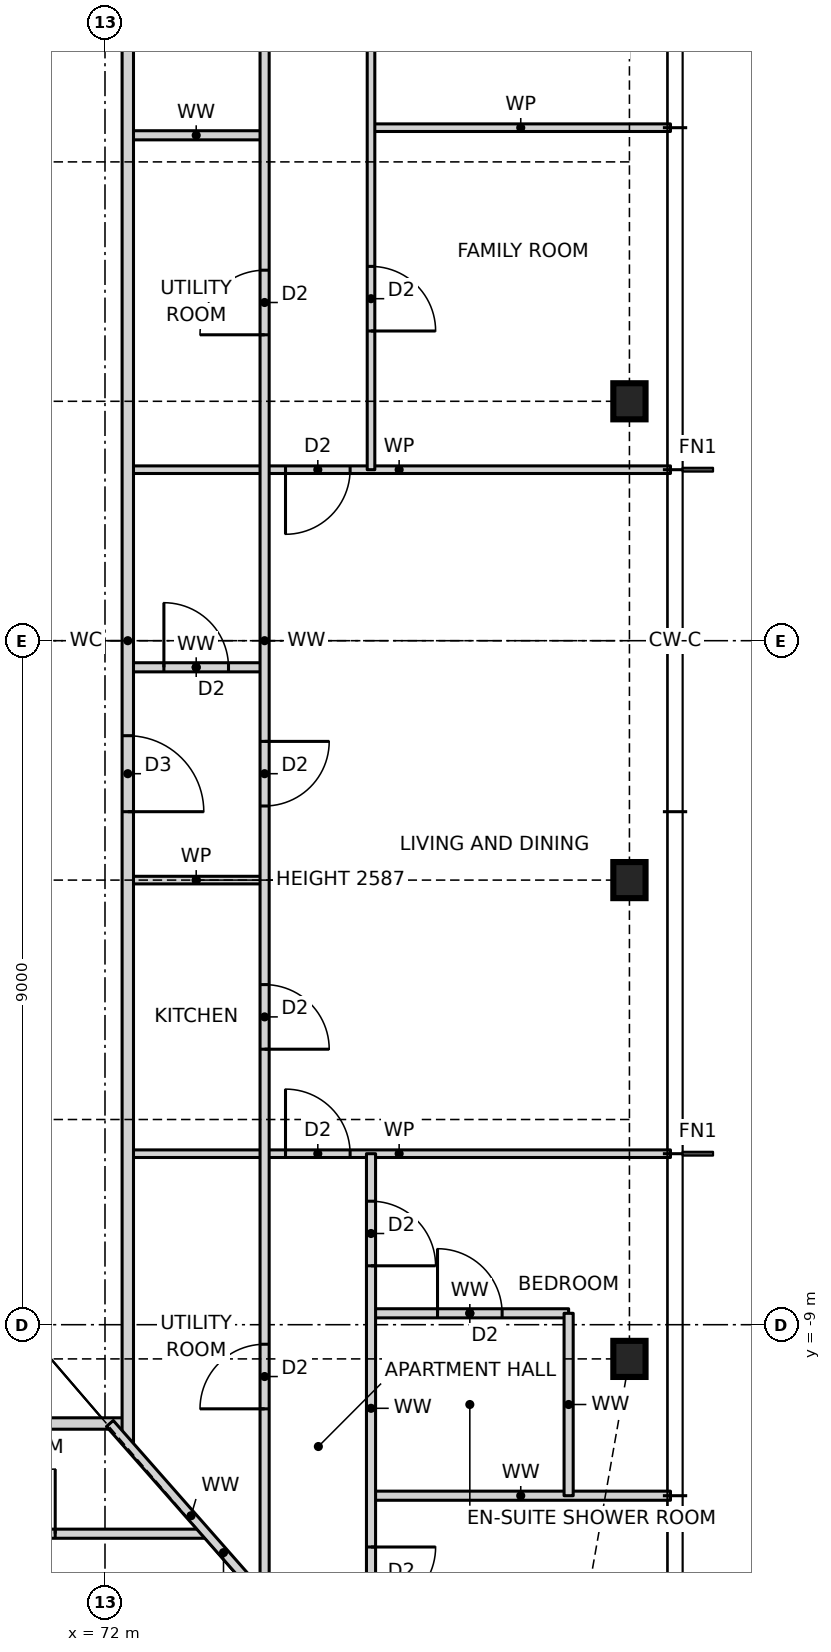
"""IFC4 building model, lengths in metres.
Left out: names, types, materials, properties, quantities, classifications, styles, units other than length and angle.
Written with IfcOpenShell. Run it as: python <this file> out.ifc"""

import sys

from ifc_helpers import new_model, si_unit, direction, frame, frame_2d, origin, origin_2d, place, context, subcontext, project, spatial, rectangle, i_section, extrude, element, fill, save


model = new_model("IFC4")
c1 = context("Model", 3, precision=1e-05, world=origin(), true_north=direction((0.0, 1.0)))
c2 = subcontext(c1, "Body", "Model", "MODEL_VIEW")
j1 = project(units=[si_unit("LENGTHUNIT", "METRE"), si_unit("PLANEANGLEUNIT", "RADIAN")], contexts=[c1])
p1 = place(None, origin())
s1 = spatial("IfcSite", under=j1, at=p1, CompositionType="ELEMENT")
p2 = place(p1, origin())
s2 = spatial("IfcBuilding", under=s1, at=p2, CompositionType="ELEMENT")
p3 = place(p2, frame((0.0, 0.0, 46.5)))
s3 = spatial("IfcBuildingStorey", under=s2, at=p3, CompositionType="ELEMENT", Elevation=46.5)
for number, where, z_axis, x_axis in (
    (1, (78.9, -9.45, 0.0), (0.0, 0.0, 1.0), (1.0, 0.0, 0.0)),
    (2, (78.9, -3.15, 0.0), (0.0, 0.0, 1.0), (1.0, 0.0, 0.0)),
    (3, (78.9, 3.15, 0.0), (0.0, 0.0, 1.0), (1.0, 0.0, 0.0)),
):
    element("IfcColumn", number, at=place(p3, frame(where, z_axis=z_axis, x_axis=x_axis)), inside=s3, PredefinedType="COLUMN", context=c2, shape_type="SweptSolid", body=[
        extrude(i_section(OverallWidth=0.424, OverallDepth=0.475, WebThickness=0.048, FlangeThickness=0.077, at=origin_2d()), origin(), (0.0, 0.0, 1.0), 3.5),
    ])
p4 = place(p3, frame((54.0, -11.75, 0.0), z_axis=(0.0, 0.0, 1.0), x_axis=(1.0, 0.0, 0.0)))
e4 = element("IfcWall", 4, at=p4, inside=s3, PredefinedType="PARTITIONING", context=c2, shape_type="SweptSolid", body=[
    extrude(rectangle(XDim=19.34, YDim=0.12, at=frame_2d((9.67, 0.0))), origin(), (0.0, 0.0, 1.0), 3.27),
])
p5 = place(p4, frame((1.375, 0.0, 0.0)))
e5 = element("IfcOpeningElement", 5, at=p5, cuts=e4, PredefinedType="OPENING", context=c2, shape_type="SweptSolid", body=[
    extrude(rectangle(XDim=0.85, YDim=2.1, at=frame_2d((0.425, 1.05))), frame((0.0, 0.07, 0.0), z_axis=(0.0, -1.0, 0.0), x_axis=(1.0, 0.0, 0.0)), (0.0, 0.0, 1.0), 0.14),
])
p6 = place(p4, frame((4.575, 0.0, 0.0)))
e6 = element("IfcOpeningElement", 6, at=p6, cuts=e4, PredefinedType="OPENING", context=c2, shape_type="SweptSolid", body=[
    extrude(rectangle(XDim=0.85, YDim=2.1, at=frame_2d((0.425, 1.05))), frame((0.0, 0.07, 0.0), z_axis=(0.0, -1.0, 0.0), x_axis=(1.0, 0.0, 0.0)), (0.0, 0.0, 1.0), 0.14),
])
p7 = place(p4, frame((11.325, 0.0, 0.0)))
e7 = element("IfcOpeningElement", 7, at=p7, cuts=e4, PredefinedType="OPENING", context=c2, shape_type="SweptSolid", body=[
    extrude(rectangle(XDim=0.85, YDim=2.1, at=frame_2d((0.425, 1.05))), frame((0.0, 0.07, 0.0), z_axis=(0.0, -1.0, 0.0), x_axis=(1.0, 0.0, 0.0)), (0.0, 0.0, 1.0), 0.14),
])
p8 = place(p4, frame((16.495, 0.0, 0.0)))
e8 = element("IfcOpeningElement", 8, at=p8, cuts=e4, PredefinedType="OPENING", context=c2, shape_type="SweptSolid", body=[
    extrude(rectangle(XDim=0.85, YDim=2.1, at=frame_2d((0.425, 1.05))), frame((0.0, 0.07, 0.0), z_axis=(0.0, -1.0, 0.0), x_axis=(1.0, 0.0, 0.0)), (0.0, 0.0, 1.0), 0.14),
])
p9 = place(p3, frame((75.5, -11.25, 0.0), z_axis=(0.0, 0.0, 1.0), x_axis=(1.0, 0.0, 0.0)))
e9 = element("IfcWall", 9, at=p9, inside=s3, PredefinedType="PARTITIONING", context=c2, shape_type="SweptSolid", body=[
    extrude(rectangle(XDim=3.94, YDim=0.12, at=frame_2d((1.97, 0.0))), origin(), (0.0, 0.0, 1.0), 3.27),
])
p10 = place(p3, frame((53.7, -10.3, 0.0), z_axis=(0.0, 0.0, 1.0), x_axis=(1.0, 0.0, 0.0)))
e10 = element("IfcWall", 10, at=p10, inside=s3, PredefinedType="PARTITIONING", context=c2, shape_type="SweptSolid", body=[
    extrude(rectangle(XDim=18.6, YDim=0.15, at=frame_2d((9.3, 0.0))), origin(), (0.0, 0.0, 1.0), 3.27),
])
p11 = place(p10, frame((4.8, 0.0, 0.0)))
e11 = element("IfcOpeningElement", 11, at=p11, cuts=e10, PredefinedType="OPENING", context=c2, shape_type="SweptSolid", body=[
    extrude(rectangle(XDim=1.0, YDim=2.1, at=frame_2d((0.5, 1.05))), frame((0.0, 0.085, 0.0), z_axis=(0.0, -1.0, 0.0), x_axis=(1.0, 0.0, 0.0)), (0.0, 0.0, 1.0), 0.17),
])
p12 = place(p3, frame((75.5, -8.85, 0.0), z_axis=(0.0, 0.0, 1.0), x_axis=(1.0, 0.0, 0.0)))
e12 = element("IfcWall", 12, at=p12, inside=s3, PredefinedType="PARTITIONING", context=c2, shape_type="SweptSolid", body=[
    extrude(rectangle(XDim=2.6, YDim=0.12, at=frame_2d((1.3, 0.0))), origin(), (0.0, 0.0, 1.0), 3.27),
])
p13 = place(p12, frame((0.875, 0.0, 0.0)))
e13 = element("IfcOpeningElement", 13, at=p13, cuts=e12, PredefinedType="OPENING", context=c2, shape_type="SweptSolid", body=[
    extrude(rectangle(XDim=0.85, YDim=2.1, at=frame_2d((0.425, 1.05))), frame((0.0, 0.07, 0.0), z_axis=(0.0, -1.0, 0.0), x_axis=(1.0, 0.0, 0.0)), (0.0, 0.0, 1.0), 0.14),
])
p14 = place(p3, frame((72.3, -6.75, 0.0), z_axis=(0.0, 0.0, 1.0), x_axis=(1.0, 0.0, 0.0)))
e14 = element("IfcWall", 14, at=p14, inside=s3, PredefinedType="PARTITIONING", context=c2, shape_type="SweptSolid", body=[
    extrude(rectangle(XDim=7.14, YDim=0.1, at=frame_2d((3.57, 0.0))), origin(), (0.0, 0.0, 1.0), 3.27),
])
p15 = place(p14, frame((2.075, 0.0, 0.0)))
e15 = element("IfcOpeningElement", 15, at=p15, cuts=e14, PredefinedType="OPENING", context=c2, shape_type="SweptSolid", body=[
    extrude(rectangle(XDim=0.85, YDim=2.1, at=frame_2d((0.425, 1.05))), frame((0.0, 0.06, 0.0), z_axis=(0.0, -1.0, 0.0), x_axis=(1.0, 0.0, 0.0)), (0.0, 0.0, 1.0), 0.12),
])
p16 = place(p3, frame((72.3, -3.15, 0.0), z_axis=(0.0, 0.0, 1.0), x_axis=(1.0, 0.0, 0.0)))
e16 = element("IfcWall", 16, at=p16, inside=s3, PredefinedType="PARTITIONING", context=c2, shape_type="SweptSolid", body=[
    extrude(rectangle(XDim=1.8, YDim=0.1, at=frame_2d((0.9, 0.0))), origin(), (0.0, 0.0, 1.0), 2.587),
])
p17 = place(p3, frame((72.3, -0.35, 0.0), z_axis=(0.0, 0.0, 1.0), x_axis=(1.0, 0.0, 0.0)))
e17 = element("IfcWall", 17, at=p17, inside=s3, PredefinedType="PARTITIONING", context=c2, shape_type="SweptSolid", body=[
    extrude(rectangle(XDim=1.8, YDim=0.12, at=frame_2d((0.9, 0.0))), origin(), (0.0, 0.0, 1.0), 3.27),
])
p18 = place(p17, frame((0.475, 0.0, 0.0)))
e18 = element("IfcOpeningElement", 18, at=p18, cuts=e17, PredefinedType="OPENING", context=c2, shape_type="SweptSolid", body=[
    extrude(rectangle(XDim=0.85, YDim=2.1, at=frame_2d((0.425, 1.05))), frame((0.0, 0.07, 0.0), z_axis=(0.0, -1.0, 0.0), x_axis=(1.0, 0.0, 0.0)), (0.0, 0.0, 1.0), 0.14),
])
p19 = place(p3, frame((72.3, 2.25, 0.0), z_axis=(0.0, 0.0, 1.0), x_axis=(1.0, 0.0, 0.0)))
e19 = element("IfcWall", 19, at=p19, inside=s3, PredefinedType="PARTITIONING", context=c2, shape_type="SweptSolid", body=[
    extrude(rectangle(XDim=7.14, YDim=0.1, at=frame_2d((3.57, 0.0))), origin(), (0.0, 0.0, 1.0), 3.27),
])
p20 = place(p19, frame((2.075, 0.0, 0.0)))
e20 = element("IfcOpeningElement", 20, at=p20, cuts=e19, PredefinedType="OPENING", context=c2, shape_type="SweptSolid", body=[
    extrude(rectangle(XDim=0.85, YDim=2.1, at=frame_2d((0.425, 1.05))), frame((0.0, 0.06, 0.0), z_axis=(0.0, -1.0, 0.0), x_axis=(1.0, 0.0, 0.0)), (0.0, 0.0, 1.0), 0.12),
])
p21 = place(p3, frame((72.3, 6.65, 0.0), z_axis=(0.0, 0.0, 1.0), x_axis=(1.0, 0.0, 0.0)))
e21 = element("IfcWall", 21, at=p21, inside=s3, PredefinedType="PARTITIONING", context=c2, shape_type="SweptSolid", body=[
    extrude(rectangle(XDim=1.8, YDim=0.12, at=frame_2d((0.9, 0.0))), origin(), (0.0, 0.0, 1.0), 3.27),
])
p22 = place(p3, frame((75.5, 6.75, 0.0), z_axis=(0.0, 0.0, 1.0), x_axis=(1.0, 0.0, 0.0)))
e22 = element("IfcWall", 22, at=p22, inside=s3, PredefinedType="PARTITIONING", context=c2, shape_type="SweptSolid", body=[
    extrude(rectangle(XDim=3.94, YDim=0.1, at=frame_2d((1.97, 0.0))), origin(), (0.0, 0.0, 1.0), 3.27),
])
p23 = place(p3, frame((78.1, -11.25, 0.0), z_axis=(0.0, 0.0, 1.0), x_axis=(0.0, 1.0, 0.0)))
e23 = element("IfcWall", 23, at=p23, inside=s3, PredefinedType="PARTITIONING", context=c2, shape_type="SweptSolid", body=[
    extrude(rectangle(XDim=2.4, YDim=0.12, at=frame_2d((1.2, 0.0))), origin(), (0.0, 0.0, 1.0), 3.27),
])
p24 = place(p3, frame((75.5, -13.45, 0.0), z_axis=(0.0, 0.0, 1.0), x_axis=(0.0, 1.0, 0.0)))
e24 = element("IfcWall", 24, at=p24, inside=s3, PredefinedType="PARTITIONING", context=c2, shape_type="SweptSolid", body=[
    extrude(rectangle(XDim=6.7, YDim=0.12, at=frame_2d((3.35, 0.0))), origin(), (0.0, 0.0, 1.0), 3.27),
])
p25 = place(p24, frame((5.225, 0.0, 0.0)))
e25 = element("IfcOpeningElement", 25, at=p25, cuts=e24, PredefinedType="OPENING", context=c2, shape_type="SweptSolid", body=[
    extrude(rectangle(XDim=0.85, YDim=2.1, at=frame_2d((0.425, 1.05))), frame((0.0, 0.07, 0.0), z_axis=(0.0, -1.0, 0.0), x_axis=(1.0, 0.0, 0.0)), (0.0, 0.0, 1.0), 0.14),
])
p26 = place(p24, frame((0.675, 0.0, 0.0)))
e26 = element("IfcOpeningElement", 26, at=p26, cuts=e24, PredefinedType="OPENING", context=c2, shape_type="SweptSolid", body=[
    extrude(rectangle(XDim=0.85, YDim=2.1, at=frame_2d((0.425, 1.05))), frame((0.0, 0.07, 0.0), z_axis=(0.0, -1.0, 0.0), x_axis=(1.0, 0.0, 0.0)), (0.0, 0.0, 1.0), 0.14),
])
p27 = place(p3, frame((75.5, 2.25, 0.0), z_axis=(0.0, 0.0, 1.0), x_axis=(0.0, 1.0, 0.0)))
e27 = element("IfcWall", 27, at=p27, inside=s3, PredefinedType="PARTITIONING", context=c2, shape_type="SweptSolid", body=[
    extrude(rectangle(XDim=11.2, YDim=0.1, at=frame_2d((5.6, 0.0))), origin(), (0.0, 0.0, 1.0), 3.27),
])
p28 = place(p27, frame((1.825, 0.0, 0.0)))
e28 = element("IfcOpeningElement", 28, at=p28, cuts=e27, PredefinedType="OPENING", context=c2, shape_type="SweptSolid", body=[
    extrude(rectangle(XDim=0.85, YDim=2.1, at=frame_2d((0.425, 1.05))), frame((0.0, 0.06, 0.0), z_axis=(0.0, -1.0, 0.0), x_axis=(1.0, 0.0, 0.0)), (0.0, 0.0, 1.0), 0.12),
])
p29 = place(p27, frame((6.325, 0.0, 0.0)))
e29 = element("IfcOpeningElement", 29, at=p29, cuts=e27, PredefinedType="OPENING", context=c2, shape_type="SweptSolid", body=[
    extrude(rectangle(XDim=0.85, YDim=2.1, at=frame_2d((0.425, 1.05))), frame((0.0, 0.06, 0.0), z_axis=(0.0, -1.0, 0.0), x_axis=(1.0, 0.0, 0.0)), (0.0, 0.0, 1.0), 0.12),
])
p30 = place(p27, frame((9.675, 0.0, 0.0)))
e30 = element("IfcOpeningElement", 30, at=p30, cuts=e27, PredefinedType="OPENING", context=c2, shape_type="SweptSolid", body=[
    extrude(rectangle(XDim=0.85, YDim=2.1, at=frame_2d((0.425, 1.05))), frame((0.0, 0.06, 0.0), z_axis=(0.0, -1.0, 0.0), x_axis=(1.0, 0.0, 0.0)), (0.0, 0.0, 1.0), 0.12),
])
p31 = place(p3, frame((74.1, -12.614, 0.0), z_axis=(0.0, 0.0, 1.0), x_axis=(0.0, 1.0, 0.0)))
e31 = element("IfcWall", 31, at=p31, inside=s3, PredefinedType="PARTITIONING", context=c2, shape_type="SweptSolid", body=[
    extrude(rectangle(XDim=25.228, YDim=0.12, at=frame_2d((12.614, 0.0))), origin(), (0.0, 0.0, 1.0), 3.27),
])
p32 = place(p31, frame((7.239, 0.0, 0.0)))
e32 = element("IfcOpeningElement", 32, at=p32, cuts=e31, PredefinedType="OPENING", context=c2, shape_type="SweptSolid", body=[
    extrude(rectangle(XDim=0.85, YDim=2.1, at=frame_2d((0.425, 1.05))), frame((0.0, 0.07, 0.0), z_axis=(0.0, -1.0, 0.0), x_axis=(1.0, 0.0, 0.0)), (0.0, 0.0, 1.0), 0.14),
])
p33 = place(p31, frame((10.439, 0.0, 0.0)))
e33 = element("IfcOpeningElement", 33, at=p33, cuts=e31, PredefinedType="OPENING", context=c2, shape_type="SweptSolid", body=[
    extrude(rectangle(XDim=0.85, YDim=2.1, at=frame_2d((0.425, 1.05))), frame((0.0, 0.07, 0.0), z_axis=(0.0, -1.0, 0.0), x_axis=(1.0, 0.0, 0.0)), (0.0, 0.0, 1.0), 0.14),
])
p34 = place(p31, frame((2.507, 0.0, 0.0)))
e34 = element("IfcOpeningElement", 34, at=p34, cuts=e31, PredefinedType="OPENING", context=c2, shape_type="SweptSolid", body=[
    extrude(rectangle(XDim=0.85, YDim=2.1, at=frame_2d((0.425, 1.05))), frame((0.0, 0.07, 0.0), z_axis=(0.0, -1.0, 0.0), x_axis=(1.0, 0.0, 0.0)), (0.0, 0.0, 1.0), 0.14),
])
p35 = place(p31, frame((16.639, 0.0, 0.0)))
e35 = element("IfcOpeningElement", 35, at=p35, cuts=e31, PredefinedType="OPENING", context=c2, shape_type="SweptSolid", body=[
    extrude(rectangle(XDim=0.85, YDim=2.1, at=frame_2d((0.425, 1.05))), frame((0.0, 0.07, 0.0), z_axis=(0.0, -1.0, 0.0), x_axis=(1.0, 0.0, 0.0)), (0.0, 0.0, 1.0), 0.14),
])
p36 = place(p31, frame((21.821, 0.0, 0.0)))
e36 = element("IfcOpeningElement", 36, at=p36, cuts=e31, PredefinedType="OPENING", context=c2, shape_type="SweptSolid", body=[
    extrude(rectangle(XDim=0.85, YDim=2.1, at=frame_2d((0.425, 1.05))), frame((0.0, 0.07, 0.0), z_axis=(0.0, -1.0, 0.0), x_axis=(1.0, 0.0, 0.0)), (0.0, 0.0, 1.0), 0.14),
])
p37 = place(p3, frame((72.3, -10.568, 0.0), z_axis=(0.0, 0.0, 1.0), x_axis=(0.0, 1.0, 0.0)))
e37 = element("IfcWall", 37, at=p37, inside=s3, PredefinedType="PARTITIONING", context=c2, shape_type="SweptSolid", body=[
    extrude(rectangle(XDim=21.136, YDim=0.15, at=frame_2d((10.568, 0.0))), origin(), (0.0, 0.0, 1.0), 3.27),
])
p38 = place(p37, frame((8.318, 0.0, 0.0)))
e38 = element("IfcOpeningElement", 38, at=p38, cuts=e37, PredefinedType="OPENING", context=c2, shape_type="SweptSolid", body=[
    extrude(rectangle(XDim=1.0, YDim=2.1, at=frame_2d((0.5, 1.05))), frame((0.0, 0.085, 0.0), z_axis=(0.0, -1.0, 0.0), x_axis=(1.0, 0.0, 0.0)), (0.0, 0.0, 1.0), 0.17),
])
p39 = place(p3, frame((74.2, -12.727, 0.0), z_axis=(0.0, 0.0, 1.0), x_axis=(-0.660667046586, 0.75067906162, 0.0)))
e39 = element("IfcWall", 39, at=p39, inside=s3, PredefinedType="PARTITIONING", context=c2, shape_type="SweptSolid", body=[
    extrude(rectangle(XDim=3.233, YDim=0.12, at=frame_2d((1.617, 0.0))), origin(), (0.0, 0.0, 1.0), 2.429),
])
p40 = place(p8, origin())
e40 = element("IfcDoor", 40, at=p40, inside=s3, OperationType="SINGLE_SWING_RIGHT", PredefinedType="DOOR", context=c2, shape_type="SweptSolid", body=[
    extrude(rectangle(XDim=0.85, YDim=2.1, at=frame_2d((0.425, 1.05))), frame((0.0, 0.025, 0.0), z_axis=(0.0, -1.0, 0.0), x_axis=(1.0, 0.0, 0.0)), (0.0, 0.0, 1.0), 0.05),
])
fill(e8, e40)
p41 = place(p32, frame((0.85, 0.0, 0.0), z_axis=(0.0, 0.0, 1.0), x_axis=(-1.0, 0.0, 0.0)))
e41 = element("IfcDoor", 41, at=p41, inside=s3, OperationType="SINGLE_SWING_RIGHT", PredefinedType="DOOR", context=c2, shape_type="SweptSolid", body=[
    extrude(rectangle(XDim=0.85, YDim=2.1, at=frame_2d((0.425, 1.05))), frame((0.0, 0.025, 0.0), z_axis=(0.0, -1.0, 0.0), x_axis=(1.0, 0.0, 0.0)), (0.0, 0.0, 1.0), 0.05),
])
fill(e32, e41)
p42 = place(p38, frame((1.0, 0.0, 0.0), z_axis=(0.0, 0.0, 1.0), x_axis=(-1.0, 0.0, 0.0)))
e42 = element("IfcDoor", 42, at=p42, inside=s3, OperationType="SINGLE_SWING_RIGHT", PredefinedType="DOOR", context=c2, shape_type="SweptSolid", body=[
    extrude(rectangle(XDim=1.0, YDim=2.1, at=frame_2d((0.5, 1.05))), frame((0.0, 0.025, 0.0), z_axis=(0.0, -1.0, 0.0), x_axis=(1.0, 0.0, 0.0)), (0.0, 0.0, 1.0), 0.05),
])
fill(e38, e42)
p43 = place(p33, frame((0.85, 0.0, 0.0), z_axis=(0.0, 0.0, 1.0), x_axis=(-1.0, 0.0, 0.0)))
e43 = element("IfcDoor", 43, at=p43, inside=s3, OperationType="SINGLE_SWING_LEFT", PredefinedType="DOOR", context=c2, shape_type="SweptSolid", body=[
    extrude(rectangle(XDim=0.85, YDim=2.1, at=frame_2d((0.425, 1.05))), frame((0.0, 0.025, 0.0), z_axis=(0.0, -1.0, 0.0), x_axis=(1.0, 0.0, 0.0)), (0.0, 0.0, 1.0), 0.05),
])
fill(e33, e43)
p44 = place(p18, origin())
e44 = element("IfcDoor", 44, at=p44, inside=s3, OperationType="SINGLE_SWING_LEFT", PredefinedType="DOOR", context=c2, shape_type="SweptSolid", body=[
    extrude(rectangle(XDim=0.85, YDim=2.1, at=frame_2d((0.425, 1.05))), frame((0.0, 0.025, 0.0), z_axis=(0.0, -1.0, 0.0), x_axis=(1.0, 0.0, 0.0)), (0.0, 0.0, 1.0), 0.05),
])
fill(e18, e44)
p45 = place(p15, origin())
e45 = element("IfcDoor", 45, at=p45, inside=s3, OperationType="SINGLE_SWING_LEFT", PredefinedType="DOOR", context=c2, shape_type="SweptSolid", body=[
    extrude(rectangle(XDim=0.85, YDim=2.1, at=frame_2d((0.425, 1.05))), frame((0.0, 0.025, 0.0), z_axis=(0.0, -1.0, 0.0), x_axis=(1.0, 0.0, 0.0)), (0.0, 0.0, 1.0), 0.05),
])
fill(e15, e45)
p46 = place(p13, origin())
e46 = element("IfcDoor", 46, at=p46, inside=s3, OperationType="SINGLE_SWING_LEFT", PredefinedType="DOOR", context=c2, shape_type="SweptSolid", body=[
    extrude(rectangle(XDim=0.85, YDim=2.1, at=frame_2d((0.425, 1.05))), frame((0.0, 0.025, 0.0), z_axis=(0.0, -1.0, 0.0), x_axis=(1.0, 0.0, 0.0)), (0.0, 0.0, 1.0), 0.05),
])
fill(e13, e46)
p47 = place(p25, frame((0.85, 0.0, 0.0), z_axis=(0.0, 0.0, 1.0), x_axis=(-1.0, 0.0, 0.0)))
e47 = element("IfcDoor", 47, at=p47, inside=s3, OperationType="SINGLE_SWING_RIGHT", PredefinedType="DOOR", context=c2, shape_type="SweptSolid", body=[
    extrude(rectangle(XDim=0.85, YDim=2.1, at=frame_2d((0.425, 1.05))), frame((0.0, 0.025, 0.0), z_axis=(0.0, -1.0, 0.0), x_axis=(1.0, 0.0, 0.0)), (0.0, 0.0, 1.0), 0.05),
])
fill(e25, e47)
p48 = place(p26, frame((0.85, 0.0, 0.0), z_axis=(0.0, 0.0, 1.0), x_axis=(-1.0, 0.0, 0.0)))
e48 = element("IfcDoor", 48, at=p48, inside=s3, OperationType="SINGLE_SWING_LEFT", PredefinedType="DOOR", context=c2, shape_type="SweptSolid", body=[
    extrude(rectangle(XDim=0.85, YDim=2.1, at=frame_2d((0.425, 1.05))), frame((0.0, 0.025, 0.0), z_axis=(0.0, -1.0, 0.0), x_axis=(1.0, 0.0, 0.0)), (0.0, 0.0, 1.0), 0.05),
])
fill(e26, e48)
p49 = place(p34, origin())
e49 = element("IfcDoor", 49, at=p49, inside=s3, OperationType="SINGLE_SWING_LEFT", PredefinedType="DOOR", context=c2, shape_type="SweptSolid", body=[
    extrude(rectangle(XDim=0.85, YDim=2.1, at=frame_2d((0.425, 1.05))), frame((0.0, 0.025, 0.0), z_axis=(0.0, -1.0, 0.0), x_axis=(1.0, 0.0, 0.0)), (0.0, 0.0, 1.0), 0.05),
])
fill(e34, e49)
p50 = place(p20, frame((0.85, 0.0, 0.0), z_axis=(0.0, 0.0, 1.0), x_axis=(-1.0, 0.0, 0.0)))
e50 = element("IfcDoor", 50, at=p50, inside=s3, OperationType="SINGLE_SWING_RIGHT", PredefinedType="DOOR", context=c2, shape_type="SweptSolid", body=[
    extrude(rectangle(XDim=0.85, YDim=2.1, at=frame_2d((0.425, 1.05))), frame((0.0, 0.025, 0.0), z_axis=(0.0, -1.0, 0.0), x_axis=(1.0, 0.0, 0.0)), (0.0, 0.0, 1.0), 0.05),
])
fill(e20, e50)
p51 = place(p28, frame((0.85, 0.0, 0.0), z_axis=(0.0, 0.0, 1.0), x_axis=(-1.0, 0.0, 0.0)))
e51 = element("IfcDoor", 51, at=p51, inside=s3, OperationType="SINGLE_SWING_RIGHT", PredefinedType="DOOR", context=c2, shape_type="SweptSolid", body=[
    extrude(rectangle(XDim=0.85, YDim=2.1, at=frame_2d((0.425, 1.05))), frame((0.0, 0.025, 0.0), z_axis=(0.0, -1.0, 0.0), x_axis=(1.0, 0.0, 0.0)), (0.0, 0.0, 1.0), 0.05),
])
fill(e28, e51)
p52 = place(p35, origin())
e52 = element("IfcDoor", 52, at=p52, inside=s3, OperationType="SINGLE_SWING_LEFT", PredefinedType="DOOR", context=c2, shape_type="SweptSolid", body=[
    extrude(rectangle(XDim=0.85, YDim=2.1, at=frame_2d((0.425, 1.05))), frame((0.0, 0.025, 0.0), z_axis=(0.0, -1.0, 0.0), x_axis=(1.0, 0.0, 0.0)), (0.0, 0.0, 1.0), 0.05),
])
fill(e35, e52)
save(model, sys.argv[1])
